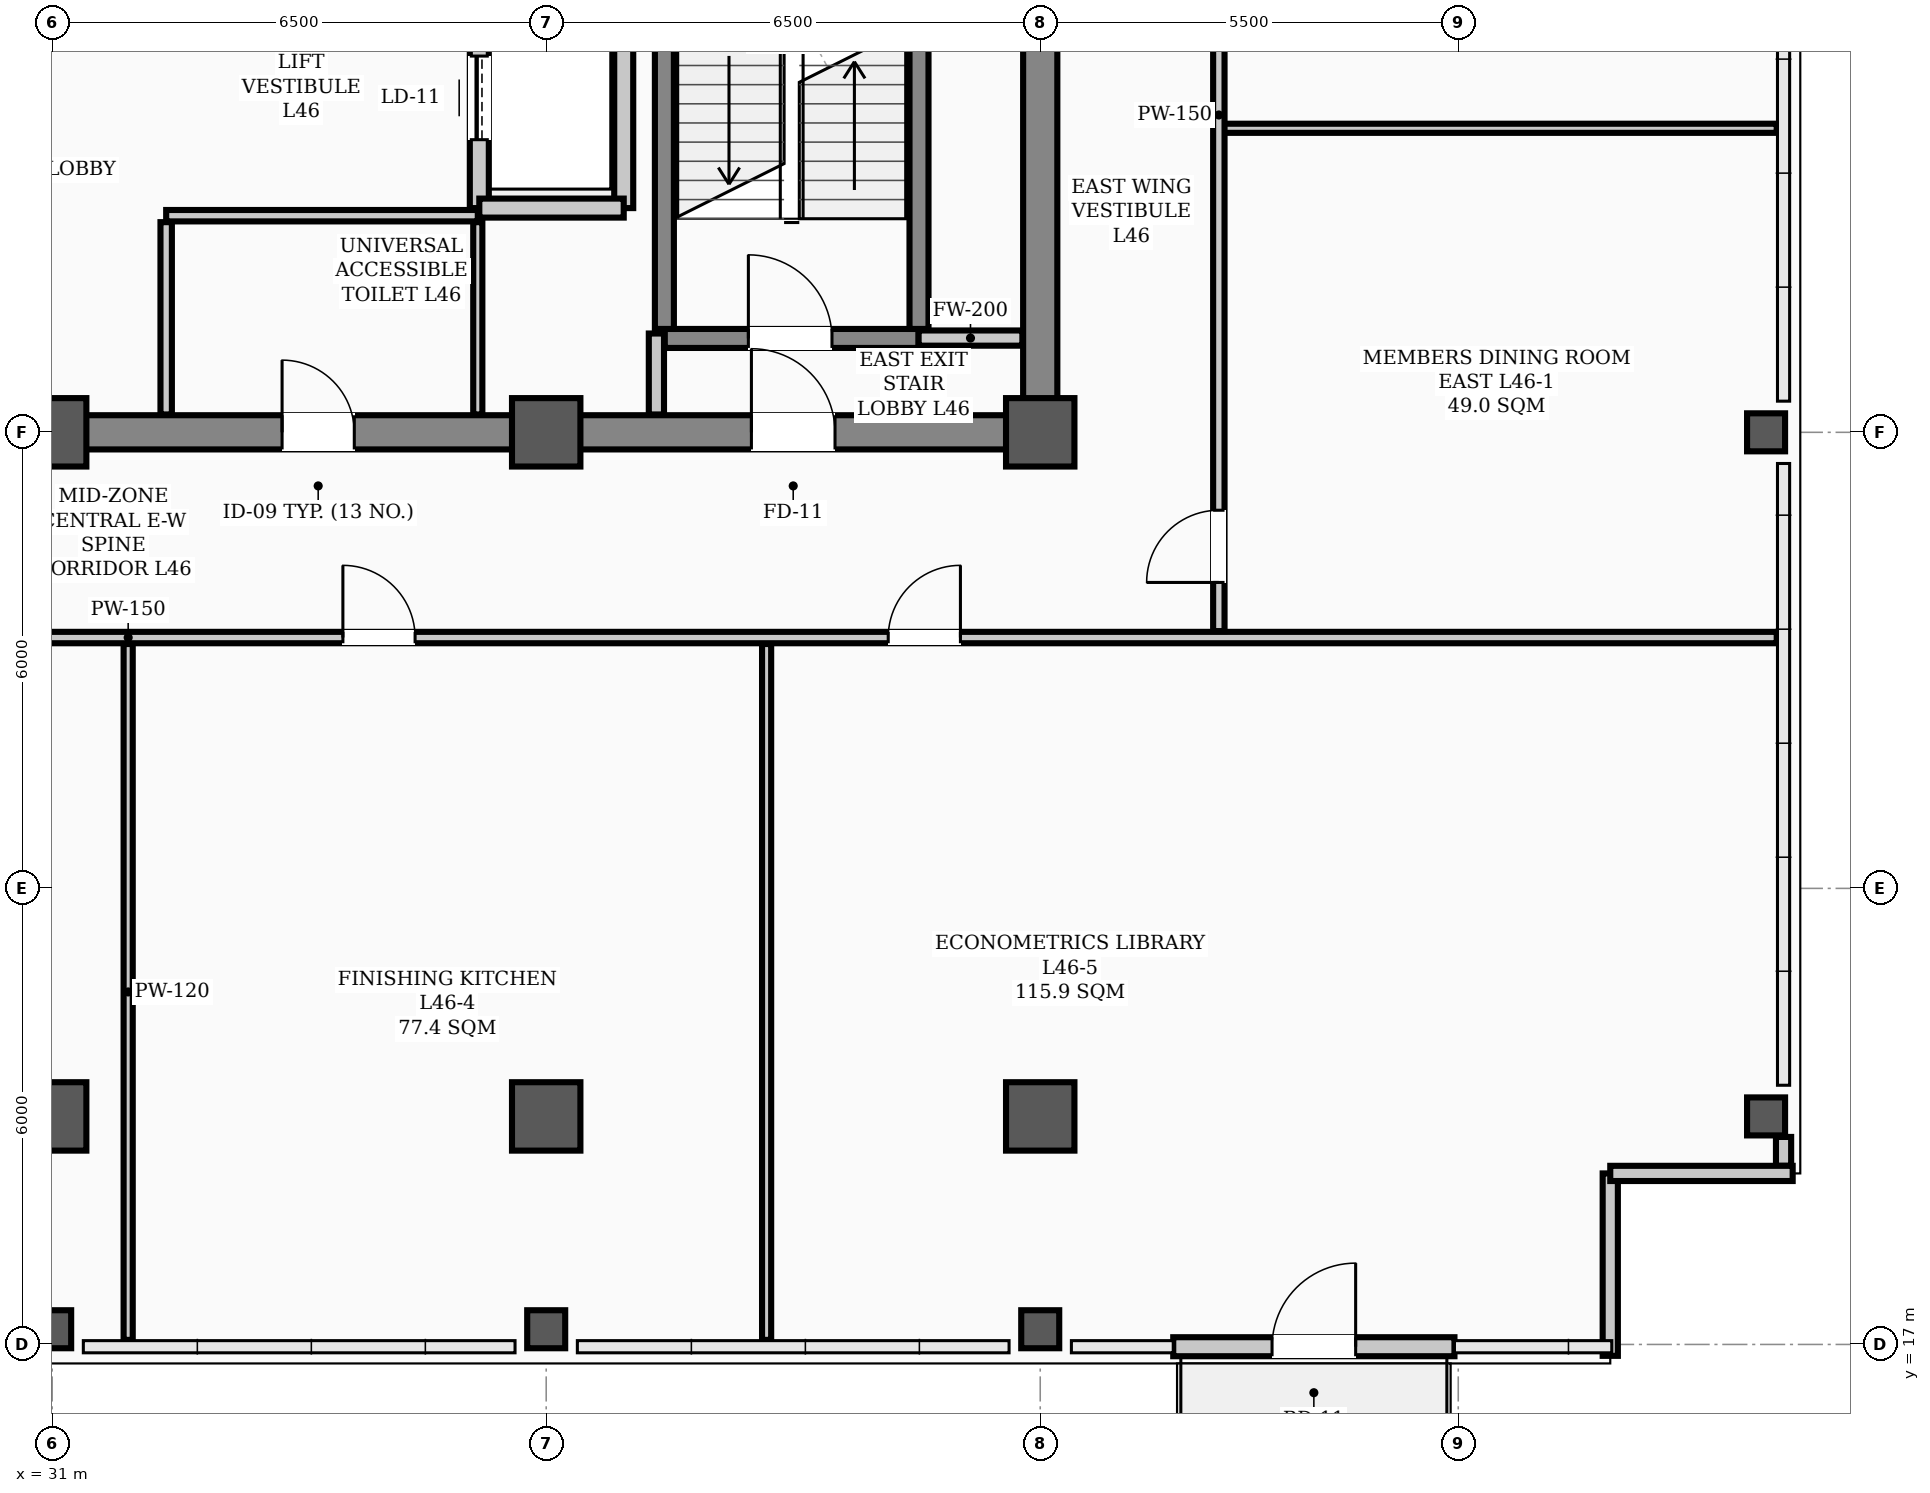
"""IFC4 building model, lengths in metres.
Left out: names, types, materials, properties, quantities, classifications, styles, units other than length and angle.
Written with IfcOpenShell. Run it as: python <this file> out.ifc"""

import sys

from ifc_helpers import new_model, si_unit, direction, frame, frame_2d, origin, origin_2d, place, context, subcontext, project, spatial, rectangle, hollow_rectangle, extrude, element, fill, save


model = new_model("IFC4")
c1 = context("Model", 3, precision=1e-05, world=origin(), true_north=direction((0.0, 1.0)))
c2 = subcontext(c1, "Body", "Model", "MODEL_VIEW")
j1 = project(units=[si_unit("LENGTHUNIT", "METRE"), si_unit("PLANEANGLEUNIT", "RADIAN")], contexts=[c1])
p1 = place(None, origin())
s1 = spatial("IfcSite", under=j1, at=p1, CompositionType="ELEMENT")
p2 = place(p1, origin())
s2 = spatial("IfcBuilding", under=s1, at=p2, CompositionType="ELEMENT")
p3 = place(p2, frame((0.0, 0.0, 185.1)))
s3 = spatial("IfcBuildingStorey", under=s2, at=p3, CompositionType="ELEMENT", Elevation=185.1)
for number, where, z_axis, x_axis in (
    (1, (31.0, 29.0, 0.0), (0.0, 0.0, 1.0), (1.0, 0.0, 0.0)),
    (2, (37.5, 29.0, 0.0), (0.0, 0.0, 1.0), (1.0, 0.0, 0.0)),
    (3, (44.0, 29.0, 0.0), (0.0, 0.0, 1.0), (1.0, 0.0, 0.0)),
    (4, (31.0, 20.0, 0.0), (0.0, 0.0, 1.0), (1.0, 0.0, 0.0)),
    (5, (37.5, 20.0, 0.0), (0.0, 0.0, 1.0), (1.0, 0.0, 0.0)),
    (6, (44.0, 20.0, 0.0), (0.0, 0.0, 1.0), (1.0, 0.0, 0.0)),
):
    element("IfcColumn", number, at=place(p3, frame(where, z_axis=z_axis, x_axis=x_axis)), inside=s3, PredefinedType="COLUMN", context=c2, shape_type="SweptSolid", body=[
        extrude(hollow_rectangle(XDim=0.9, YDim=0.9, WallThickness=0.035, InnerFilletRadius=0.017, OuterFilletRadius=0.052, at=origin_2d()), origin(), (0.0, 0.0, 1.0), 3.9),
    ])
for number, where, z_axis, x_axis in (
    (7, (31.0, 17.2, 0.0), (0.0, 0.0, 1.0), (1.0, 0.0, 0.0)),
    (8, (37.5, 17.2, 0.0), (0.0, 0.0, 1.0), (1.0, 0.0, 0.0)),
    (9, (44.0, 17.2, 0.0), (0.0, 0.0, 1.0), (1.0, 0.0, 0.0)),
    (10, (53.55, 20.0, 0.0), (0.0, 0.0, 1.0), (1.0, 0.0, 0.0)),
    (11, (53.55, 29.0, 0.0), (0.0, 0.0, 1.0), (1.0, 0.0, 0.0)),
):
    element("IfcColumn", number, at=place(p3, frame(where, z_axis=z_axis, x_axis=x_axis)), inside=s3, PredefinedType="COLUMN", context=c2, shape_type="SweptSolid", body=[
        extrude(hollow_rectangle(XDim=0.5, YDim=0.5, WallThickness=0.024, InnerFilletRadius=0.012, OuterFilletRadius=0.036, at=origin_2d()), origin(), (0.0, 0.0, 1.0), 3.9),
    ])
p4 = place(p3, frame((53.78, 19.35, 0.0), z_axis=(0.0, 0.0, 1.0), x_axis=(0.0, 1.0, 0.0)))
e12 = element("IfcWall", 12, at=p4, inside=s3, PredefinedType="PARAPET", context=c2, shape_type="SweptSolid", body=[
    extrude(rectangle(XDim=0.38, YDim=0.2, at=frame_2d((0.19, 0.0))), origin(), (0.0, 0.0, 1.0), 1.2),
])
for number, where, z_axis, x_axis in (
    (13, (51.5, 16.85, 0.0), (0.0, 0.0, 1.0), (0.0, 1.0, 0.0)),
    (14, (51.5, 19.25, 0.0), (0.0, 0.0, 1.0), (1.0, 0.0, 0.0)),
):
    element("IfcWall", number, at=place(p3, frame(where, z_axis=z_axis, x_axis=x_axis)), inside=s3, PredefinedType="PARAPET", context=c2, shape_type="SweptSolid", body=[
        extrude(rectangle(XDim=2.4, YDim=0.2, at=frame_2d((1.2, 0.0))), origin(), (0.0, 0.0, 1.0), 1.2),
    ])
p5 = place(p3, frame((45.75, 16.97, 0.0), z_axis=(0.0, 0.0, 1.0), x_axis=(1.0, 0.0, 0.0)))
e15 = element("IfcWall", 15, at=p5, inside=s3, PredefinedType="STANDARD", context=c2, shape_type="SweptSolid", body=[
    extrude(rectangle(XDim=3.7, YDim=0.25, at=frame_2d((1.85, 0.0))), origin(), (0.0, 0.0, 1.0), 3.18),
])
p6 = place(p5, frame((1.3, 0.0, 0.0)))
e16 = element("IfcOpeningElement", 16, at=p6, cuts=e15, PredefinedType="OPENING", context=c2, shape_type="SweptSolid", body=[
    extrude(rectangle(XDim=1.1, YDim=2.2, at=frame_2d((0.55, 1.1))), frame((0.0, 0.135, 0.0), z_axis=(0.0, -1.0, 0.0), x_axis=(1.0, 0.0, 0.0)), (0.0, 0.0, 1.0), 0.27),
])
p7 = place(p3, frame((13.5, 29.0, 0.0), z_axis=(0.0, 0.0, 1.0), x_axis=(1.0, 0.0, 0.0)))
e17 = element("IfcWall", 17, at=p7, inside=s3, PredefinedType="SHEAR", context=c2, shape_type="SweptSolid", body=[
    extrude(rectangle(XDim=30.5, YDim=0.45, at=frame_2d((15.25, 0.0))), origin(), (0.0, 0.0, 1.0), 3.72),
])
p8 = place(p7, frame((1.75, 0.0, 0.0)))
e18 = element("IfcOpeningElement", 18, at=p8, cuts=e17, PredefinedType="OPENING", context=c2, shape_type="SweptSolid", body=[
    extrude(rectangle(XDim=1.1, YDim=2.08, at=frame_2d((0.55, 1.04))), frame((0.0, 0.235, 0.0), z_axis=(0.0, -1.0, 0.0), x_axis=(1.0, 0.0, 0.0)), (0.0, 0.0, 1.0), 0.47),
])
p9 = place(p7, frame((26.7, 0.0, 0.0)))
e19 = element("IfcOpeningElement", 19, at=p9, cuts=e17, PredefinedType="OPENING", context=c2, shape_type="SweptSolid", body=[
    extrude(rectangle(XDim=1.1, YDim=2.08, at=frame_2d((0.55, 1.04))), frame((0.0, 0.235, 0.0), z_axis=(0.0, -1.0, 0.0), x_axis=(1.0, 0.0, 0.0)), (0.0, 0.0, 1.0), 0.47),
])
p10 = place(p7, frame((6.8, 0.0, 0.0)))
e20 = element("IfcOpeningElement", 20, at=p10, cuts=e17, PredefinedType="OPENING", context=c2, shape_type="SweptSolid", body=[
    extrude(rectangle(XDim=1.1, YDim=2.08, at=frame_2d((0.55, 1.04))), frame((0.0, 0.235, 0.0), z_axis=(0.0, -1.0, 0.0), x_axis=(1.0, 0.0, 0.0)), (0.0, 0.0, 1.0), 0.47),
])
p11 = place(p7, frame((13.2, 0.0, 0.0)))
e21 = element("IfcOpeningElement", 21, at=p11, cuts=e17, PredefinedType="OPENING", context=c2, shape_type="SweptSolid", body=[
    extrude(rectangle(XDim=1.6, YDim=2.08, at=frame_2d((0.8, 1.04))), frame((0.0, 0.235, 0.0), z_axis=(0.0, -1.0, 0.0), x_axis=(1.0, 0.0, 0.0)), (0.0, 0.0, 1.0), 0.47),
])
p12 = place(p7, frame((20.525, 0.0, 0.0)))
e22 = element("IfcOpeningElement", 22, at=p12, cuts=e17, PredefinedType="OPENING", context=c2, shape_type="SweptSolid", body=[
    extrude(rectangle(XDim=0.95, YDim=2.08, at=frame_2d((0.475, 1.04))), frame((0.0, 0.235, 0.0), z_axis=(0.0, -1.0, 0.0), x_axis=(1.0, 0.0, 0.0)), (0.0, 0.0, 1.0), 0.47),
])
p13 = place(p3, frame((44.0, 29.35, 0.0), z_axis=(0.0, 0.0, 1.0), x_axis=(0.0, 1.0, 0.0)))
e23 = element("IfcWall", 23, at=p13, inside=s3, PredefinedType="SHEAR", context=c2, shape_type="SweptSolid", body=[
    extrude(rectangle(XDim=8.6, YDim=0.45, at=frame_2d((4.3, 0.0))), origin(), (0.0, 0.0, 1.0), 3.72),
])
p14 = place(p3, frame((39.06, 30.235, 0.0), z_axis=(0.0, 0.0, 1.0), x_axis=(1.0, 0.0, 0.0)))
e24 = element("IfcWall", 24, at=p14, inside=s3, PredefinedType="STANDARD", context=c2, shape_type="SweptSolid", body=[
    extrude(rectangle(XDim=3.34, YDim=0.25, at=frame_2d((1.67, 0.0))), origin(), (0.0, 0.0, 1.0), 3.72),
])
p15 = place(p14, frame((1.1, 0.0, 0.0)))
e25 = element("IfcOpeningElement", 25, at=p15, cuts=e24, PredefinedType="OPENING", context=c2, shape_type="SweptSolid", body=[
    extrude(rectangle(XDim=1.1, YDim=2.08, at=frame_2d((0.55, 1.04))), frame((0.0, 0.135, 0.0), z_axis=(0.0, -1.0, 0.0), x_axis=(1.0, 0.0, 0.0)), (0.0, 0.0, 1.0), 0.27),
])
for number, where, z_axis, x_axis in (
    (26, (39.055, 30.36, 0.0), (0.0, 0.0, 1.0), (0.0, 1.0, 0.0)),
    (27, (42.405, 30.36, 0.0), (0.0, 0.0, 1.0), (0.0, 1.0, 0.0)),
):
    element("IfcWall", number, at=place(p3, frame(where, z_axis=z_axis, x_axis=x_axis)), inside=s3, PredefinedType="STANDARD", context=c2, shape_type="SweptSolid", body=[
        extrude(rectangle(XDim=7.184, YDim=0.25, at=frame_2d((3.592, 0.0))), origin(), (0.0, 0.0, 1.0), 3.72),
    ])
p16 = place(p3, frame((36.62, 31.95, 0.0), z_axis=(0.0, 0.0, 1.0), x_axis=(0.0, 1.0, 0.0)))
e28 = element("IfcWall", 28, at=p16, inside=s3, PredefinedType="STANDARD", context=c2, shape_type="SweptSolid", body=[
    extrude(rectangle(XDim=6.0, YDim=0.25, at=frame_2d((3.0, 0.0))), origin(), (0.0, 0.0, 1.0), 3.35),
])
p17 = place(p16, frame((0.9, 0.0, 0.0)))
e29 = element("IfcOpeningElement", 29, at=p17, cuts=e28, PredefinedType="OPENING", context=c2, shape_type="SweptSolid", body=[
    extrude(rectangle(XDim=1.1, YDim=2.08, at=frame_2d((0.55, 1.04))), frame((0.0, 0.135, 0.0), z_axis=(0.0, -1.0, 0.0), x_axis=(1.0, 0.0, 0.0)), (0.0, 0.0, 1.0), 0.27),
])
p18 = place(p16, frame((4.0, 0.0, 0.0)))
e30 = element("IfcOpeningElement", 30, at=p18, cuts=e28, PredefinedType="OPENING", context=c2, shape_type="SweptSolid", body=[
    extrude(rectangle(XDim=1.1, YDim=2.08, at=frame_2d((0.55, 1.04))), frame((0.0, 0.135, 0.0), z_axis=(0.0, -1.0, 0.0), x_axis=(1.0, 0.0, 0.0)), (0.0, 0.0, 1.0), 0.27),
])
p19 = place(p3, frame((38.52, 31.95, 0.0), z_axis=(0.0, 0.0, 1.0), x_axis=(0.0, 1.0, 0.0)))
e31 = element("IfcWall", 31, at=p19, inside=s3, PredefinedType="STANDARD", context=c2, shape_type="SweptSolid", body=[
    extrude(rectangle(XDim=6.0, YDim=0.25, at=frame_2d((3.0, 0.0))), origin(), (0.0, 0.0, 1.0), 3.35),
])
p20 = place(p3, frame((36.62, 31.95, 0.0), z_axis=(0.0, 0.0, 1.0), x_axis=(1.0, 0.0, 0.0)))
e32 = element("IfcWall", 32, at=p20, inside=s3, PredefinedType="STANDARD", context=c2, shape_type="SweptSolid", body=[
    extrude(rectangle(XDim=1.9, YDim=0.25, at=frame_2d((0.95, 0.0))), origin(), (0.0, 0.0, 1.0), 3.48),
])
p21 = place(p3, frame((42.4, 30.24, 0.0), z_axis=(0.0, 0.0, 1.0), x_axis=(1.0, 0.0, 0.0)))
e33 = element("IfcWall", 33, at=p21, inside=s3, PredefinedType="STANDARD", context=c2, shape_type="SweptSolid", body=[
    extrude(rectangle(XDim=1.365, YDim=0.2, at=frame_2d((0.683, 0.0))), origin(), (0.0, 0.0, 1.0), 3.2),
])
p22 = place(p3, frame((32.5, 31.85, 0.0), z_axis=(0.0, 0.0, 1.0), x_axis=(1.0, 0.0, 0.0)))
e34 = element("IfcWall", 34, at=p22, inside=s3, PredefinedType="PARTITIONING", context=c2, shape_type="SweptSolid", body=[
    extrude(rectangle(XDim=4.1, YDim=0.15, at=frame_2d((2.05, 0.0))), origin(), (0.0, 0.0, 1.0), 3.72),
])
p23 = place(p3, frame((10.31, 26.3, 0.0), z_axis=(0.0, 0.0, 1.0), x_axis=(1.0, 0.0, 0.0)))
e35 = element("IfcWall", 35, at=p23, inside=s3, PredefinedType="PARTITIONING", context=c2, shape_type="SweptSolid", body=[
    extrude(rectangle(XDim=43.38, YDim=0.15, at=frame_2d((21.69, 0.0))), origin(), (0.0, 0.0, 1.0), 3.2),
])
p24 = place(p23, frame((0.97, 0.0, 0.0)))
e36 = element("IfcOpeningElement", 36, at=p24, cuts=e35, PredefinedType="OPENING", context=c2, shape_type="SweptSolid", body=[
    extrude(rectangle(XDim=0.95, YDim=2.08, at=frame_2d((0.475, 1.04))), frame((0.0, 0.085, 0.0), z_axis=(0.0, -1.0, 0.0), x_axis=(1.0, 0.0, 0.0)), (0.0, 0.0, 1.0), 0.17),
])
p25 = place(p23, frame((8.315, 0.0, 0.0)))
e37 = element("IfcOpeningElement", 37, at=p25, cuts=e35, PredefinedType="OPENING", context=c2, shape_type="SweptSolid", body=[
    extrude(rectangle(XDim=0.95, YDim=2.08, at=frame_2d((0.475, 1.04))), frame((0.0, 0.085, 0.0), z_axis=(0.0, -1.0, 0.0), x_axis=(1.0, 0.0, 0.0)), (0.0, 0.0, 1.0), 0.17),
])
p26 = place(p23, frame((16.815, 0.0, 0.0)))
e38 = element("IfcOpeningElement", 38, at=p26, cuts=e35, PredefinedType="OPENING", context=c2, shape_type="SweptSolid", body=[
    extrude(rectangle(XDim=0.95, YDim=2.08, at=frame_2d((0.475, 1.04))), frame((0.0, 0.085, 0.0), z_axis=(0.0, -1.0, 0.0), x_axis=(1.0, 0.0, 0.0)), (0.0, 0.0, 1.0), 0.17),
])
p27 = place(p23, frame((24.515, 0.0, 0.0)))
e39 = element("IfcOpeningElement", 39, at=p27, cuts=e35, PredefinedType="OPENING", context=c2, shape_type="SweptSolid", body=[
    extrude(rectangle(XDim=0.95, YDim=2.08, at=frame_2d((0.475, 1.04))), frame((0.0, 0.085, 0.0), z_axis=(0.0, -1.0, 0.0), x_axis=(1.0, 0.0, 0.0)), (0.0, 0.0, 1.0), 0.17),
])
p28 = place(p23, frame((31.69, 0.0, 0.0)))
e40 = element("IfcOpeningElement", 40, at=p28, cuts=e35, PredefinedType="OPENING", context=c2, shape_type="SweptSolid", body=[
    extrude(rectangle(XDim=0.95, YDim=2.08, at=frame_2d((0.475, 1.04))), frame((0.0, 0.085, 0.0), z_axis=(0.0, -1.0, 0.0), x_axis=(1.0, 0.0, 0.0)), (0.0, 0.0, 1.0), 0.17),
])
p29 = place(p3, frame((46.35, 33.0, 0.0), z_axis=(0.0, 0.0, 1.0), x_axis=(1.0, 0.0, 0.0)))
e41 = element("IfcWall", 41, at=p29, inside=s3, PredefinedType="PARTITIONING", context=c2, shape_type="SweptSolid", body=[
    extrude(rectangle(XDim=7.34, YDim=0.12, at=frame_2d((3.67, 0.0))), origin(), (0.0, 0.0, 1.0), 3.212),
])
p30 = place(p3, frame((38.95, 29.235, 0.0), z_axis=(0.0, 0.0, 1.0), x_axis=(0.0, 1.0, 0.0)))
e42 = element("IfcWall", 42, at=p30, inside=s3, PredefinedType="STANDARD", context=c2, shape_type="SweptSolid", body=[
    extrude(rectangle(XDim=1.065, YDim=0.2, at=frame_2d((0.532, 0.0))), origin(), (0.0, 0.0, 1.0), 3.35),
])
p31 = place(p3, frame((32.5, 29.235, 0.0), z_axis=(0.0, 0.0, 1.0), x_axis=(0.0, 1.0, 0.0)))
e43 = element("IfcWall", 43, at=p31, inside=s3, PredefinedType="PARTITIONING", context=c2, shape_type="SweptSolid", body=[
    extrude(rectangle(XDim=2.53, YDim=0.15, at=frame_2d((1.265, 0.0))), origin(), (0.0, 0.0, 1.0), 3.35),
])
p32 = place(p3, frame((36.6, 29.235, 0.0), z_axis=(0.0, 0.0, 1.0), x_axis=(0.0, 1.0, 0.0)))
e44 = element("IfcWall", 44, at=p32, inside=s3, PredefinedType="PARTITIONING", context=c2, shape_type="SweptSolid", body=[
    extrude(rectangle(XDim=2.53, YDim=0.12, at=frame_2d((1.265, 0.0))), origin(), (0.0, 0.0, 1.0), 3.35),
])
p33 = place(p3, frame((46.35, 26.385, 0.0), z_axis=(0.0, 0.0, 1.0), x_axis=(0.0, 1.0, 0.0)))
e45 = element("IfcWall", 45, at=p33, inside=s3, PredefinedType="PARTITIONING", context=c2, shape_type="SweptSolid", body=[
    extrude(rectangle(XDim=13.58, YDim=0.15, at=frame_2d((6.79, 0.0))), origin(), (0.0, 0.0, 1.0), 3.1),
])
p34 = place(p33, frame((0.64, 0.0, 0.0)))
e46 = element("IfcOpeningElement", 46, at=p34, cuts=e45, PredefinedType="OPENING", context=c2, shape_type="SweptSolid", body=[
    extrude(rectangle(XDim=0.95, YDim=2.08, at=frame_2d((0.475, 1.04))), frame((0.0, 0.085, 0.0), z_axis=(0.0, -1.0, 0.0), x_axis=(1.0, 0.0, 0.0)), (0.0, 0.0, 1.0), 0.17),
])
p35 = place(p33, frame((9.665, 0.0, 0.0)))
e47 = element("IfcOpeningElement", 47, at=p35, cuts=e45, PredefinedType="OPENING", context=c2, shape_type="SweptSolid", body=[
    extrude(rectangle(XDim=0.95, YDim=2.08, at=frame_2d((0.475, 1.04))), frame((0.0, 0.085, 0.0), z_axis=(0.0, -1.0, 0.0), x_axis=(1.0, 0.0, 0.0)), (0.0, 0.0, 1.0), 0.17),
])
for number, where, z_axis, x_axis in (
    (48, (32.0, 17.06, 0.0), (0.0, 0.0, 1.0), (0.0, 1.0, 0.0)),
    (49, (40.4, 17.06, 0.0), (0.0, 0.0, 1.0), (0.0, 1.0, 0.0)),
):
    element("IfcWall", number, at=place(p3, frame(where, z_axis=z_axis, x_axis=x_axis)), inside=s3, PredefinedType="PARTITIONING", context=c2, shape_type="SweptSolid", body=[
        extrude(rectangle(XDim=9.155, YDim=0.12, at=frame_2d((4.578, 0.0))), origin(), (0.0, 0.0, 1.0), 3.1),
    ])
p36 = place(p6, origin())
e50 = element("IfcDoor", 50, at=p36, inside=s3, OperationType="SINGLE_SWING_RIGHT", PredefinedType="DOOR", context=c2, shape_type="SweptSolid", body=[
    extrude(rectangle(XDim=1.1, YDim=2.2, at=frame_2d((0.55, 1.1))), frame((0.0, 0.025, 0.0), z_axis=(0.0, -1.0, 0.0), x_axis=(1.0, 0.0, 0.0)), (0.0, 0.0, 1.0), 0.05),
])
fill(e16, e50)
p37 = place(p15, origin())
e51 = element("IfcDoor", 51, at=p37, inside=s3, OperationType="SINGLE_SWING_LEFT", PredefinedType="DOOR", context=c2, shape_type="SweptSolid", body=[
    extrude(rectangle(XDim=1.1, YDim=2.08, at=frame_2d((0.55, 1.04))), frame((0.0, 0.025, 0.0), z_axis=(0.0, -1.0, 0.0), x_axis=(1.0, 0.0, 0.0)), (0.0, 0.0, 1.0), 0.05),
])
fill(e25, e51)
p38 = place(p9, origin())
e52 = element("IfcDoor", 52, at=p38, inside=s3, OperationType="SINGLE_SWING_LEFT", PredefinedType="DOOR", context=c2, shape_type="SweptSolid", body=[
    extrude(rectangle(XDim=1.1, YDim=2.08, at=frame_2d((0.55, 1.04))), frame((0.0, 0.025, 0.0), z_axis=(0.0, -1.0, 0.0), x_axis=(1.0, 0.0, 0.0)), (0.0, 0.0, 1.0), 0.05),
])
fill(e19, e52)
p39 = place(p12, origin())
e53 = element("IfcDoor", 53, at=p39, inside=s3, OperationType="SINGLE_SWING_LEFT", PredefinedType="DOOR", context=c2, shape_type="SweptSolid", body=[
    extrude(rectangle(XDim=0.95, YDim=2.08, at=frame_2d((0.475, 1.04))), frame((0.0, 0.025, 0.0), z_axis=(0.0, -1.0, 0.0), x_axis=(1.0, 0.0, 0.0)), (0.0, 0.0, 1.0), 0.05),
])
fill(e22, e53)
p40 = place(p27, origin())
e54 = element("IfcDoor", 54, at=p40, inside=s3, OperationType="SINGLE_SWING_LEFT", PredefinedType="DOOR", context=c2, shape_type="SweptSolid", body=[
    extrude(rectangle(XDim=0.95, YDim=2.08, at=frame_2d((0.475, 1.04))), frame((0.0, 0.025, 0.0), z_axis=(0.0, -1.0, 0.0), x_axis=(1.0, 0.0, 0.0)), (0.0, 0.0, 1.0), 0.05),
])
fill(e39, e54)
p41 = place(p28, origin())
e55 = element("IfcDoor", 55, at=p41, inside=s3, OperationType="SINGLE_SWING_RIGHT", PredefinedType="DOOR", context=c2, shape_type="SweptSolid", body=[
    extrude(rectangle(XDim=0.95, YDim=2.08, at=frame_2d((0.475, 1.04))), frame((0.0, 0.025, 0.0), z_axis=(0.0, -1.0, 0.0), x_axis=(1.0, 0.0, 0.0)), (0.0, 0.0, 1.0), 0.05),
])
fill(e40, e55)
p42 = place(p34, origin())
e56 = element("IfcDoor", 56, at=p42, inside=s3, OperationType="SINGLE_SWING_LEFT", PredefinedType="DOOR", context=c2, shape_type="SweptSolid", body=[
    extrude(rectangle(XDim=0.95, YDim=2.08, at=frame_2d((0.475, 1.04))), frame((0.0, 0.025, 0.0), z_axis=(0.0, -1.0, 0.0), x_axis=(1.0, 0.0, 0.0)), (0.0, 0.0, 1.0), 0.05),
])
fill(e46, e56)
p43 = place(p17, origin())
e57 = element("IfcDoor", 57, at=p43, inside=s3, OperationType="SLIDING_TO_LEFT", PredefinedType="DOOR", context=c2, shape_type="SweptSolid", body=[
    extrude(rectangle(XDim=1.1, YDim=2.08, at=frame_2d((0.55, 1.04))), frame((0.0, 0.025, 0.0), z_axis=(0.0, -1.0, 0.0), x_axis=(1.0, 0.0, 0.0)), (0.0, 0.0, 1.0), 0.05),
])
fill(e29, e57)
save(model, sys.argv[1])
